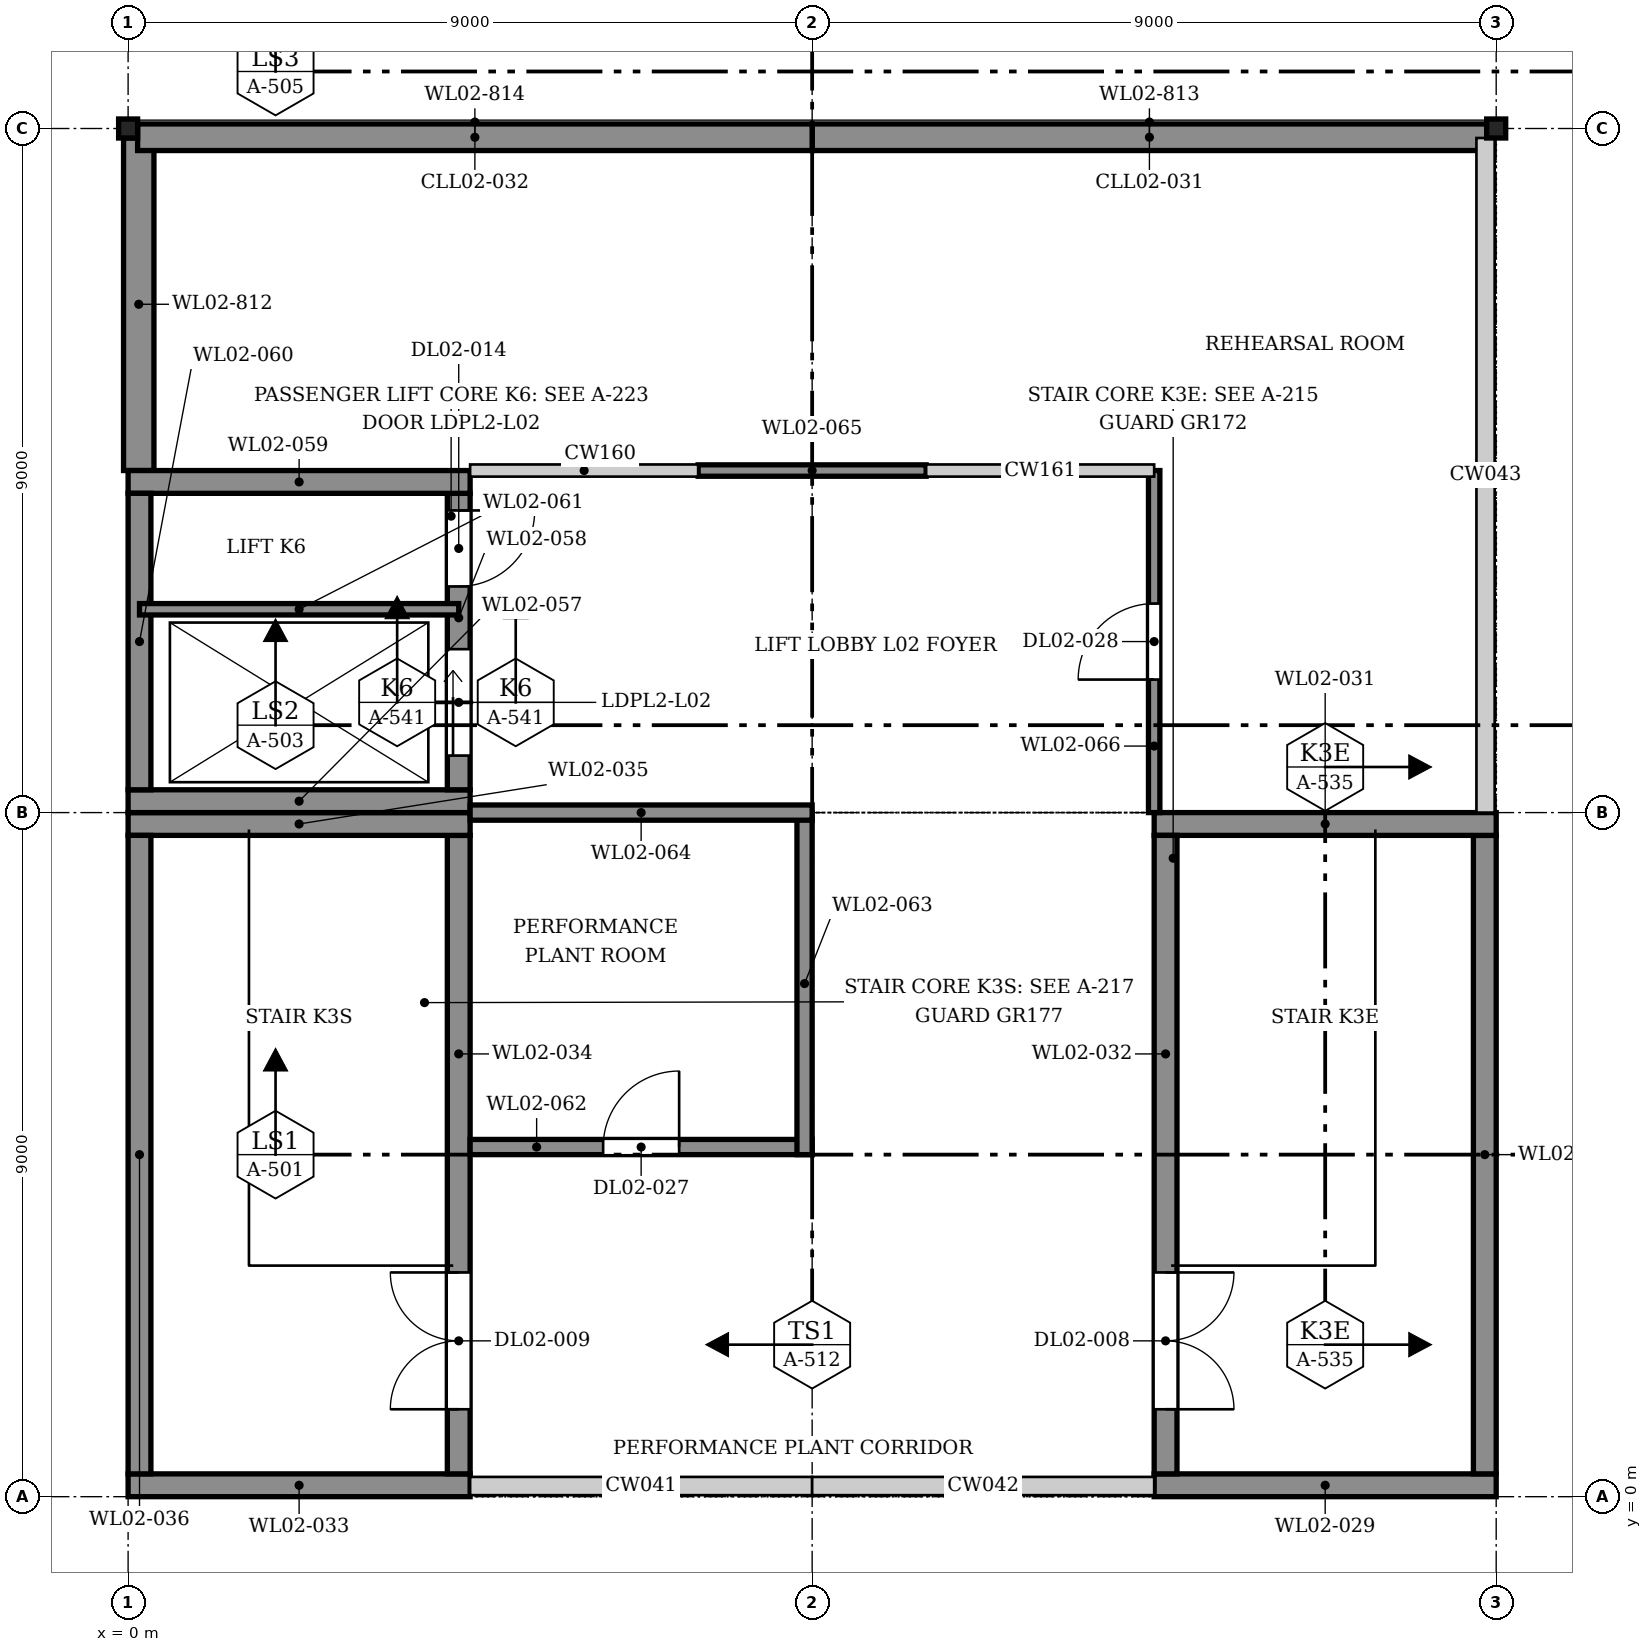
"""IFC4 building model, lengths in metres.
Left out: names, types, materials, properties, quantities, classifications, styles, units other than length and angle.
Written with IfcOpenShell. Run it as: python <this file> out.ifc"""

import sys

from ifc_helpers import new_model, si_unit, direction, frame, frame_2d, origin, origin_2d, place, context, subcontext, project, spatial, polyline, rectangle, hollow_rectangle, outline, extrude, element, fill, save


model = new_model("IFC4")
c1 = context("Model", 3, precision=1e-05, world=origin(), true_north=direction((0.0, 1.0)))
c2 = subcontext(c1, "Body", "Model", "MODEL_VIEW")
j1 = project(units=[si_unit("LENGTHUNIT", "METRE"), si_unit("PLANEANGLEUNIT", "RADIAN")], contexts=[c1])
p1 = place(None, origin())
s1 = spatial("IfcSite", under=j1, at=p1, CompositionType="ELEMENT")
p2 = place(p1, origin())
s2 = spatial("IfcBuilding", under=s1, at=p2, CompositionType="ELEMENT")
p3 = place(p2, frame((0.0, 0.0, 9.2)))
s3 = spatial("IfcBuildingStorey", under=s2, at=p3, CompositionType="ELEMENT", Elevation=9.2)
for number, where, z_axis, x_axis in (
    (1, (0.0, 18.0, 0.0), (0.0, 0.0, 1.0), (1.0, 0.0, 0.0)),
    (2, (18.0, 18.0, 0.0), (0.0, 0.0, 1.0), (1.0, 0.0, 0.0)),
):
    element("IfcColumn", number, at=place(p3, frame(where, z_axis=z_axis, x_axis=x_axis)), inside=s3, PredefinedType="COLUMN", context=c2, shape_type="SweptSolid", body=[
        extrude(hollow_rectangle(XDim=0.25, YDim=0.25, WallThickness=0.01, InnerFilletRadius=0.015, OuterFilletRadius=0.025, at=origin_2d()), origin(), (0.0, 0.0, 1.0), 4.2),
    ])
p4 = place(p3, frame((0.14, 13.5, 0.0), z_axis=(0.0, 0.0, 1.0), x_axis=(0.0, 1.0, 0.0)))
e3 = element("IfcWall", 3, at=p4, inside=s3, PredefinedType="SOLIDWALL", context=c2, shape_type="SweptSolid", body=[
    extrude(outline(polyline([(0.0, 0.0), (4.375, 0.0), (4.375, 5.51), (0.0, 5.16), (0.0, 0.0)])), frame((0.0, 0.2, 0.0), z_axis=(0.0, -1.0, 0.0), x_axis=(1.0, 0.0, 0.0)), (0.0, 0.0, 1.0), 0.4),
])
for number, where, z_axis, x_axis in (
    (4, (9.0, 17.885, 0.0), (0.0, 0.0, 1.0), (1.0, 0.0, 0.0)),
    (5, (0.125, 17.885, 0.0), (0.0, 0.0, 1.0), (1.0, 0.0, 0.0)),
):
    element("IfcWall", number, at=place(p3, frame(where, z_axis=z_axis, x_axis=x_axis)), inside=s3, PredefinedType="SOLIDWALL", context=c2, shape_type="SweptSolid", body=[
        extrude(rectangle(XDim=8.875, YDim=0.35, at=frame_2d((4.438, 0.0))), origin(), (0.0, 0.0, 1.0), 5.511),
    ])
p5 = place(p3, frame((17.885, 9.0, 4.8), z_axis=(0.0, 0.0, 1.0), x_axis=(0.0, 1.0, 0.0)))
e6 = element("IfcWall", 6, at=p5, inside=s3, PredefinedType="SOLIDWALL", context=c2, shape_type="SweptSolid", body=[
    extrude(outline(polyline([(0.0, 0.0), (8.875, 0.0), (8.875, 0.71), (0.0, 0.0), (0.0, 0.0)])), frame((0.0, 0.175, 0.0), z_axis=(0.0, -1.0, 0.0), x_axis=(1.0, 0.0, 0.0)), (0.0, 0.0, 1.0), 0.35),
])
p6 = place(p3, frame((13.5, 0.15, 0.0), z_axis=(0.0, 0.0, 1.0), x_axis=(1.0, 0.0, 0.0)))
e7 = element("IfcWall", 7, at=p6, inside=s3, PredefinedType="SOLIDWALL", context=c2, shape_type="SweptSolid", body=[
    extrude(rectangle(XDim=4.5, YDim=0.3, at=frame_2d((2.25, 0.0))), origin(), (0.0, 0.0, 1.0), 4.092),
])
p7 = place(p3, frame((17.85, 0.3, 0.0), z_axis=(0.0, 0.0, 1.0), x_axis=(0.0, 1.0, 0.0)))
e8 = element("IfcWall", 8, at=p7, inside=s3, PredefinedType="SOLIDWALL", context=c2, shape_type="SweptSolid", body=[
    extrude(outline(polyline([(0.0, 0.0), (8.4, 0.0), (8.4, 4.776), (0.0, 4.104), (0.0, 0.0)])), frame((0.0, 0.15, 0.0), z_axis=(0.0, -1.0, 0.0), x_axis=(1.0, 0.0, 0.0)), (0.0, 0.0, 1.0), 0.3),
])
p8 = place(p3, frame((13.5, 8.85, 0.0), z_axis=(0.0, 0.0, 1.0), x_axis=(1.0, 0.0, 0.0)))
e9 = element("IfcWall", 9, at=p8, inside=s3, PredefinedType="SOLIDWALL", context=c2, shape_type="SweptSolid", body=[
    extrude(rectangle(XDim=4.5, YDim=0.3, at=frame_2d((2.25, 0.0))), origin(), (0.0, 0.0, 1.0), 4.788),
])
p9 = place(p3, frame((13.65, 0.3, 0.0), z_axis=(0.0, 0.0, 1.0), x_axis=(0.0, 1.0, 0.0)))
e10 = element("IfcWall", 10, at=p9, inside=s3, PredefinedType="SOLIDWALL", context=c2, shape_type="SweptSolid", body=[
    extrude(outline(polyline([(0.0, 0.0), (8.4, 0.0), (8.4, 4.776), (0.0, 4.104), (0.0, 0.0)])), frame((0.0, 0.15, 0.0), z_axis=(0.0, -1.0, 0.0), x_axis=(1.0, 0.0, 0.0)), (0.0, 0.0, 1.0), 0.3),
])
p10 = place(p9, frame((0.85, 0.0, 0.0)))
e11 = element("IfcOpeningElement", 11, at=p10, cuts=e10, PredefinedType="OPENING", context=c2, shape_type="SweptSolid", body=[
    extrude(rectangle(XDim=1.8, YDim=2.1, at=frame_2d((0.9, 1.05))), frame((0.0, 0.16, 0.0), z_axis=(0.0, -1.0, 0.0), x_axis=(1.0, 0.0, 0.0)), (0.0, 0.0, 1.0), 0.32),
])
p11 = place(p3, frame((0.0, 0.15, 0.0), z_axis=(0.0, 0.0, 1.0), x_axis=(1.0, 0.0, 0.0)))
e12 = element("IfcWall", 12, at=p11, inside=s3, PredefinedType="SOLIDWALL", context=c2, shape_type="SweptSolid", body=[
    extrude(rectangle(XDim=4.5, YDim=0.3, at=frame_2d((2.25, 0.0))), origin(), (0.0, 0.0, 1.0), 4.092),
])
p12 = place(p3, frame((4.35, 0.3, 0.0), z_axis=(0.0, 0.0, 1.0), x_axis=(0.0, 1.0, 0.0)))
e13 = element("IfcWall", 13, at=p12, inside=s3, PredefinedType="SOLIDWALL", context=c2, shape_type="SweptSolid", body=[
    extrude(outline(polyline([(0.0, 0.0), (8.4, 0.0), (8.4, 4.776), (0.0, 4.104), (0.0, 0.0)])), frame((0.0, 0.15, 0.0), z_axis=(0.0, -1.0, 0.0), x_axis=(1.0, 0.0, 0.0)), (0.0, 0.0, 1.0), 0.3),
])
p13 = place(p12, frame((0.85, 0.0, 0.0)))
e14 = element("IfcOpeningElement", 14, at=p13, cuts=e13, PredefinedType="OPENING", context=c2, shape_type="SweptSolid", body=[
    extrude(rectangle(XDim=1.8, YDim=2.1, at=frame_2d((0.9, 1.05))), frame((0.0, 0.16, 0.0), z_axis=(0.0, -1.0, 0.0), x_axis=(1.0, 0.0, 0.0)), (0.0, 0.0, 1.0), 0.32),
])
p14 = place(p3, frame((0.0, 8.85, 0.0), z_axis=(0.0, 0.0, 1.0), x_axis=(1.0, 0.0, 0.0)))
e15 = element("IfcWall", 15, at=p14, inside=s3, PredefinedType="SOLIDWALL", context=c2, shape_type="SweptSolid", body=[
    extrude(rectangle(XDim=4.5, YDim=0.3, at=frame_2d((2.25, 0.0))), origin(), (0.0, 0.0, 1.0), 4.788),
])
p15 = place(p3, frame((0.15, 0.3, 0.0), z_axis=(0.0, 0.0, 1.0), x_axis=(0.0, 1.0, 0.0)))
e16 = element("IfcWall", 16, at=p15, inside=s3, PredefinedType="SOLIDWALL", context=c2, shape_type="SweptSolid", body=[
    extrude(outline(polyline([(0.0, 0.0), (8.4, 0.0), (8.4, 4.776), (0.0, 4.104), (0.0, 0.0)])), frame((0.0, 0.15, 0.0), z_axis=(0.0, -1.0, 0.0), x_axis=(1.0, 0.0, 0.0)), (0.0, 0.0, 1.0), 0.3),
])
p16 = place(p3, frame((0.0, 9.15, 0.0), z_axis=(0.0, 0.0, 1.0), x_axis=(1.0, 0.0, 0.0)))
e17 = element("IfcWall", 17, at=p16, inside=s3, PredefinedType="SOLIDWALL", context=c2, shape_type="SweptSolid", body=[
    extrude(rectangle(XDim=4.5, YDim=0.3, at=frame_2d((2.25, 0.0))), origin(), (0.0, 0.0, 1.0), 4.812),
])
p17 = place(p3, frame((4.35, 9.3, 0.0), z_axis=(0.0, 0.0, 1.0), x_axis=(0.0, 1.0, 0.0)))
e18 = element("IfcWall", 18, at=p17, inside=s3, PredefinedType="SOLIDWALL", context=c2, shape_type="SweptSolid", body=[
    extrude(outline(polyline([(0.0, 0.0), (3.9, 0.0), (3.9, 5.136), (0.0, 4.824), (0.0, 0.0)])), frame((0.0, 0.15, 0.0), z_axis=(0.0, -1.0, 0.0), x_axis=(1.0, 0.0, 0.0)), (0.0, 0.0, 1.0), 0.3),
])
p18 = place(p17, frame((0.45, 0.0, 0.0)))
e19 = element("IfcOpeningElement", 19, at=p18, cuts=e18, PredefinedType="OPENING", context=c2, shape_type="SweptSolid", body=[
    extrude(rectangle(XDim=1.4, YDim=2.1, at=frame_2d((0.7, 1.05))), frame((0.0, 0.16, 0.0), z_axis=(0.0, -1.0, 0.0), x_axis=(1.0, 0.0, 0.0)), (0.0, 0.0, 1.0), 0.32),
])
p19 = place(p17, frame((2.675, 0.0, 0.0)))
e20 = element("IfcOpeningElement", 20, at=p19, cuts=e18, PredefinedType="OPENING", context=c2, shape_type="SweptSolid", body=[
    extrude(rectangle(XDim=1.0, YDim=2.1, at=frame_2d((0.5, 1.05))), frame((0.0, 0.16, 0.0), z_axis=(0.0, -1.0, 0.0), x_axis=(1.0, 0.0, 0.0)), (0.0, 0.0, 1.0), 0.32),
])
p20 = place(p3, frame((0.0, 13.35, 0.0), z_axis=(0.0, 0.0, 1.0), x_axis=(1.0, 0.0, 0.0)))
e21 = element("IfcWall", 21, at=p20, inside=s3, PredefinedType="SOLIDWALL", context=c2, shape_type="SweptSolid", body=[
    extrude(rectangle(XDim=4.5, YDim=0.3, at=frame_2d((2.25, 0.0))), origin(), (0.0, 0.0, 1.0), 5.148),
])
p21 = place(p3, frame((0.15, 9.3, 0.0), z_axis=(0.0, 0.0, 1.0), x_axis=(0.0, 1.0, 0.0)))
e22 = element("IfcWall", 22, at=p21, inside=s3, PredefinedType="SOLIDWALL", context=c2, shape_type="SweptSolid", body=[
    extrude(outline(polyline([(0.0, 0.0), (3.9, 0.0), (3.9, 5.136), (0.0, 4.824), (0.0, 0.0)])), frame((0.0, 0.15, 0.0), z_axis=(0.0, -1.0, 0.0), x_axis=(1.0, 0.0, 0.0)), (0.0, 0.0, 1.0), 0.3),
])
p22 = place(p3, frame((0.15, 11.675, 0.0), z_axis=(0.0, 0.0, 1.0), x_axis=(1.0, 0.0, 0.0)))
e23 = element("IfcWall", 23, at=p22, inside=s3, PredefinedType="SOLIDWALL", context=c2, shape_type="SweptSolid", body=[
    extrude(rectangle(XDim=4.2, YDim=0.15, at=frame_2d((2.1, 0.0))), origin(), (0.0, 0.0, 1.0), 4.8),
])
p23 = place(p2, origin())
s4 = spatial("IfcBuildingStorey", under=s2, at=p23, CompositionType="ELEMENT", Elevation=0.0)
p24 = place(p23, frame((4.5, 18.25, -0.038), z_axis=(0.0, 0.0, 1.0), x_axis=(1.0, 0.0, 0.0)))
e24 = element("IfcWall", 24, at=p24, inside=s4, PredefinedType="PARTITIONING", context=c2, shape_type="SweptSolid", body=[
    extrude(rectangle(XDim=7.5, YDim=0.3, at=frame_2d((3.75, 0.0))), origin(), (0.0, 0.0, 1.0), 12.428),
])
p25 = place(p24, frame((0.96, 0.0, 0.0)))
e25 = element("IfcOpeningElement", 25, at=p25, cuts=e24, PredefinedType="OPENING", context=c2, shape_type="SweptSolid", body=[
    extrude(rectangle(XDim=1.8, YDim=2.1, at=frame_2d((0.9, 1.05))), frame((0.0, 0.16, 0.0), z_axis=(0.0, -1.0, 0.0), x_axis=(1.0, 0.0, 0.0)), (0.0, 0.0, 1.0), 0.32),
])
p26 = place(p24, frame((4.76, 0.0, 0.0)))
e26 = element("IfcOpeningElement", 26, at=p26, cuts=e24, PredefinedType="OPENING", context=c2, shape_type="SweptSolid", body=[
    extrude(rectangle(XDim=1.8, YDim=2.1, at=frame_2d((0.9, 1.05))), frame((0.0, 0.16, 0.0), z_axis=(0.0, -1.0, 0.0), x_axis=(1.0, 0.0, 0.0)), (0.0, 0.0, 1.0), 0.32),
])
p27 = place(p23, frame((0.25, 18.25, -0.038), z_axis=(0.0, 0.0, 1.0), x_axis=(1.0, 0.0, 0.0)))
e27 = element("IfcWall", 27, at=p27, inside=s4, PredefinedType="PARTITIONING", context=c2, shape_type="SweptSolid", body=[
    extrude(rectangle(XDim=4.25, YDim=0.3, at=frame_2d((2.125, 0.0))), origin(), (0.0, 0.0, 1.0), 12.428),
])
p28 = place(p23, frame((12.0, 18.25, -0.038), z_axis=(0.0, 0.0, 1.0), x_axis=(1.0, 0.0, 0.0)))
e28 = element("IfcWall", 28, at=p28, inside=s4, PredefinedType="PARTITIONING", context=c2, shape_type="SweptSolid", body=[
    extrude(rectangle(XDim=1.8, YDim=0.3, at=frame_2d((0.9, 0.0))), origin(), (0.0, 0.0, 1.0), 12.428),
])
p29 = place(p23, frame((13.8, 18.25, -0.038), z_axis=(0.0, 0.0, 1.0), x_axis=(1.0, 0.0, 0.0)))
e29 = element("IfcWall", 29, at=p29, inside=s4, PredefinedType="PARTITIONING", context=c2, shape_type="SweptSolid", body=[
    extrude(rectangle(XDim=4.2, YDim=0.3, at=frame_2d((2.1, 0.0))), origin(), (0.0, 0.0, 1.0), 12.428),
])
p30 = place(p3, frame((4.5, 4.6, 0.0), z_axis=(0.0, 0.0, 1.0), x_axis=(1.0, 0.0, 0.0)))
e30 = element("IfcWall", 30, at=p30, inside=s3, PredefinedType="PARTITIONING", context=c2, shape_type="SweptSolid", body=[
    extrude(rectangle(XDim=4.5, YDim=0.2, at=frame_2d((2.25, 0.0))), origin(), (0.0, 0.0, 1.0), 3.471),
])
p31 = place(p30, frame((1.75, 0.0, 0.0)))
e31 = element("IfcOpeningElement", 31, at=p31, cuts=e30, PredefinedType="OPENING", context=c2, shape_type="SweptSolid", body=[
    extrude(rectangle(XDim=1.0, YDim=2.1, at=frame_2d((0.5, 1.05))), frame((0.0, 0.11, 0.0), z_axis=(0.0, -1.0, 0.0), x_axis=(1.0, 0.0, 0.0)), (0.0, 0.0, 1.0), 0.22),
])
for number, where, z_axis, x_axis in (
    (32, (8.9, 4.5, 0.0), (0.0, 0.0, 1.0), (0.0, 1.0, 0.0)),
    (33, (4.5, 9.0, 0.0), (0.0, 0.0, 1.0), (1.0, 0.0, 0.0)),
):
    element("IfcWall", number, at=place(p3, frame(where, z_axis=z_axis, x_axis=x_axis)), inside=s3, PredefinedType="PARTITIONING", context=c2, shape_type="SweptSolid", body=[
        extrude(rectangle(XDim=4.5, YDim=0.2, at=frame_2d((2.25, 0.0))), origin(), (0.0, 0.0, 1.0), 3.471),
    ])
p32 = place(p3, frame((7.5, 13.5, 0.0), z_axis=(0.0, 0.0, 1.0), x_axis=(1.0, 0.0, 0.0)))
e34 = element("IfcWall", 34, at=p32, inside=s3, PredefinedType="PARTITIONING", context=c2, shape_type="SweptSolid", body=[
    extrude(rectangle(XDim=3.0, YDim=0.15, at=frame_2d((1.5, 0.0))), origin(), (0.0, 0.0, 1.0), 3.471),
])
p33 = place(p3, frame((13.5, 9.0, 0.0), z_axis=(0.0, 0.0, 1.0), x_axis=(0.0, 1.0, 0.0)))
e35 = element("IfcWall", 35, at=p33, inside=s3, PredefinedType="PARTITIONING", context=c2, shape_type="SweptSolid", body=[
    extrude(rectangle(XDim=4.5, YDim=0.15, at=frame_2d((2.25, 0.0))), origin(), (0.0, 0.0, 1.0), 3.471),
])
p34 = place(p33, frame((1.75, 0.0, 0.0)))
e36 = element("IfcOpeningElement", 36, at=p34, cuts=e35, PredefinedType="OPENING", context=c2, shape_type="SweptSolid", body=[
    extrude(rectangle(XDim=1.0, YDim=2.1, at=frame_2d((0.5, 1.05))), frame((0.0, 0.085, 0.0), z_axis=(0.0, -1.0, 0.0), x_axis=(1.0, 0.0, 0.0)), (0.0, 0.0, 1.0), 0.17),
])
p35 = place(p10, frame((1.8, 0.0, 0.0), z_axis=(0.0, 0.0, 1.0), x_axis=(-1.0, 0.0, 0.0)))
e37 = element("IfcDoor", 37, at=p35, inside=s3, OperationType="DOUBLE_DOOR_SINGLE_SWING", PredefinedType="DOOR", context=c2, shape_type="SweptSolid", body=[
    extrude(rectangle(XDim=1.8, YDim=2.1, at=frame_2d((0.9, 1.05))), frame((0.0, 0.025, 0.0), z_axis=(0.0, -1.0, 0.0), x_axis=(1.0, 0.0, 0.0)), (0.0, 0.0, 1.0), 0.05),
])
fill(e11, e37)
p36 = place(p13, origin())
e38 = element("IfcDoor", 38, at=p36, inside=s3, OperationType="DOUBLE_DOOR_SINGLE_SWING", PredefinedType="DOOR", context=c2, shape_type="SweptSolid", body=[
    extrude(rectangle(XDim=1.8, YDim=2.1, at=frame_2d((0.9, 1.05))), frame((0.0, 0.025, 0.0), z_axis=(0.0, -1.0, 0.0), x_axis=(1.0, 0.0, 0.0)), (0.0, 0.0, 1.0), 0.05),
])
fill(e14, e38)
p37 = place(p18, origin())
e39 = element("IfcDoor", 39, at=p37, inside=s3, OperationType="SLIDING_TO_LEFT", PredefinedType="DOOR", context=c2, shape_type="SweptSolid", body=[
    extrude(rectangle(XDim=1.4, YDim=2.1, at=frame_2d((0.7, 1.05))), frame((0.0, 0.025, 0.0), z_axis=(0.0, -1.0, 0.0), x_axis=(1.0, 0.0, 0.0)), (0.0, 0.0, 1.0), 0.05),
])
fill(e19, e39)
p38 = place(p19, frame((1.0, 0.0, 0.0), z_axis=(0.0, 0.0, 1.0), x_axis=(-1.0, 0.0, 0.0)))
e40 = element("IfcDoor", 40, at=p38, inside=s3, OperationType="SINGLE_SWING_RIGHT", PredefinedType="DOOR", context=c2, shape_type="SweptSolid", body=[
    extrude(rectangle(XDim=1.0, YDim=2.1, at=frame_2d((0.5, 1.05))), frame((0.0, 0.025, 0.0), z_axis=(0.0, -1.0, 0.0), x_axis=(1.0, 0.0, 0.0)), (0.0, 0.0, 1.0), 0.05),
])
fill(e20, e40)
p39 = place(p31, origin())
e41 = element("IfcDoor", 41, at=p39, inside=s3, OperationType="SINGLE_SWING_LEFT", PredefinedType="DOOR", context=c2, shape_type="SweptSolid", body=[
    extrude(rectangle(XDim=1.0, YDim=2.1, at=frame_2d((0.5, 1.05))), frame((0.0, 0.025, 0.0), z_axis=(0.0, -1.0, 0.0), x_axis=(1.0, 0.0, 0.0)), (0.0, 0.0, 1.0), 0.05),
])
fill(e31, e41)
p40 = place(p34, origin())
e42 = element("IfcDoor", 42, at=p40, inside=s3, OperationType="SINGLE_SWING_RIGHT", PredefinedType="DOOR", context=c2, shape_type="SweptSolid", body=[
    extrude(rectangle(XDim=1.0, YDim=2.1, at=frame_2d((0.5, 1.05))), frame((0.0, 0.025, 0.0), z_axis=(0.0, -1.0, 0.0), x_axis=(1.0, 0.0, 0.0)), (0.0, 0.0, 1.0), 0.05),
])
fill(e36, e42)
save(model, sys.argv[1])
